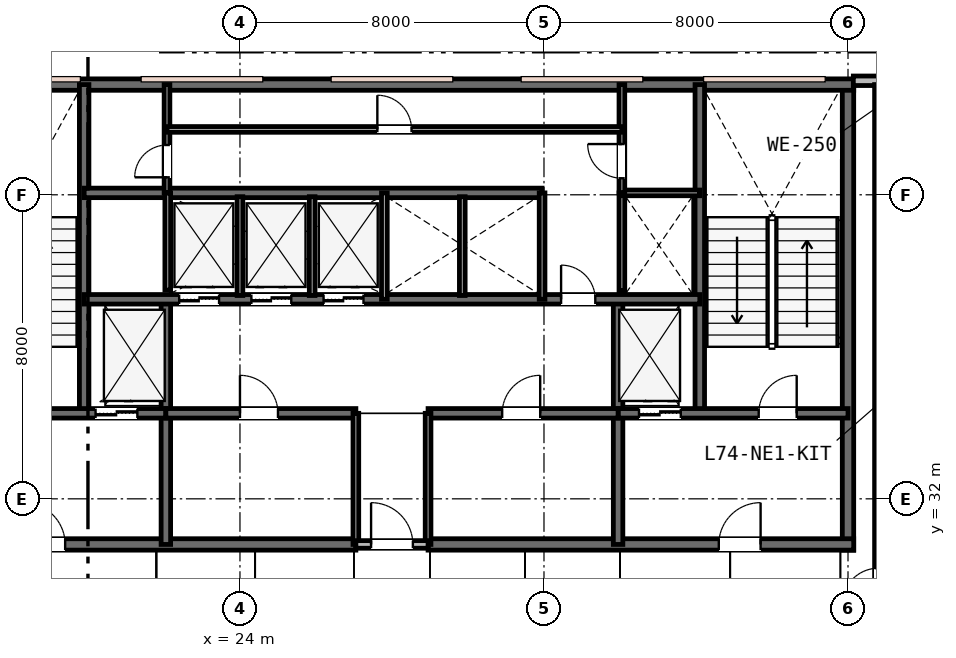
"""IFC4 building model, lengths in metres.
Left out: names, types, materials, properties, quantities, classifications, styles, units other than length and angle.
Written with IfcOpenShell. Run it as: python <this file> out.ifc"""

import sys

from ifc_helpers import new_model, si_unit, direction, frame, frame_2d, origin, place, context, subcontext, project, spatial, rectangle, extrude, element, fill, save


model = new_model("IFC4")
c1 = context("Model", 3, precision=1e-05, world=origin(), true_north=direction((0.0, 1.0)))
c2 = subcontext(c1, "Body", "Model", "MODEL_VIEW")
j1 = project(units=[si_unit("LENGTHUNIT", "METRE"), si_unit("PLANEANGLEUNIT", "RADIAN")], contexts=[c1])
p1 = place(None, origin())
s1 = spatial("IfcSite", under=j1, at=p1, CompositionType="ELEMENT")
p2 = place(p1, origin())
s2 = spatial("IfcBuilding", under=s1, at=p2, CompositionType="ELEMENT")
p3 = place(p2, frame((0.0, 0.0, 286.8)))
s3 = spatial("IfcBuildingStorey", under=s2, at=p3, CompositionType="ELEMENT", Elevation=286.8)
p4 = place(p3, frame((40.0, 30.65, 0.0), z_axis=(0.0, 0.0, 1.0), x_axis=(0.0, 1.0, 0.0)))
e1 = element("IfcWall", 1, at=p4, inside=s3, PredefinedType="SHEAR", context=c2, shape_type="SweptSolid", body=[
    extrude(rectangle(XDim=12.3, YDim=0.3, at=frame_2d((6.15, 0.0))), origin(), (0.0, 0.0, 1.0), 3.8),
])
p5 = place(p3, frame((15.85, 42.9, 0.0), z_axis=(0.0, 0.0, 1.0), x_axis=(1.0, 0.0, 0.0)))
e2 = element("IfcWall", 2, at=p5, inside=s3, PredefinedType="SHEAR", context=c2, shape_type="SweptSolid", body=[
    extrude(rectangle(XDim=24.3, YDim=0.3, at=frame_2d((12.15, 0.0))), origin(), (0.0, 0.0, 1.0), 3.8),
])
p6 = place(p3, frame((15.85, 30.8, 0.0), z_axis=(0.0, 0.0, 1.0), x_axis=(1.0, 0.0, 0.0)))
e3 = element("IfcWall", 3, at=p6, inside=s3, PredefinedType="SHEAR", context=c2, shape_type="SweptSolid", body=[
    extrude(rectangle(XDim=11.2, YDim=0.3, at=frame_2d((5.6, 0.0))), origin(), (0.0, 0.0, 1.0), 3.8),
])
p7 = place(p6, frame((2.45, 0.0, 0.0)))
e4 = element("IfcOpeningElement", 4, at=p7, cuts=e3, PredefinedType="OPENING", context=c2, shape_type="SweptSolid", body=[
    extrude(rectangle(XDim=1.1, YDim=2.15, at=frame_2d((0.55, 1.075))), frame((0.0, 0.16, 0.0), z_axis=(0.0, -1.0, 0.0), x_axis=(1.0, 0.0, 0.0)), (0.0, 0.0, 1.0), 0.32),
])
p8 = place(p3, frame((28.95, 30.8, 0.0), z_axis=(0.0, 0.0, 1.0), x_axis=(1.0, 0.0, 0.0)))
e5 = element("IfcWall", 5, at=p8, inside=s3, PredefinedType="SHEAR", context=c2, shape_type="SweptSolid", body=[
    extrude(rectangle(XDim=11.2, YDim=0.3, at=frame_2d((5.6, 0.0))), origin(), (0.0, 0.0, 1.0), 3.8),
])
p9 = place(p8, frame((7.65, 0.0, 0.0)))
e6 = element("IfcOpeningElement", 6, at=p9, cuts=e5, PredefinedType="OPENING", context=c2, shape_type="SweptSolid", body=[
    extrude(rectangle(XDim=1.1, YDim=2.15, at=frame_2d((0.55, 1.075))), frame((0.0, 0.16, 0.0), z_axis=(0.0, -1.0, 0.0), x_axis=(1.0, 0.0, 0.0)), (0.0, 0.0, 1.0), 0.32),
])
for number, where, z_axis, x_axis in (
    (7, (19.9, 34.25, 0.0), (0.0, 0.0, 1.0), (0.0, 1.0, 0.0)),
    (8, (36.1, 34.25, 0.0), (0.0, 0.0, 1.0), (0.0, 1.0, 0.0)),
):
    element("IfcWall", number, at=place(p3, frame(where, z_axis=z_axis, x_axis=x_axis)), inside=s3, PredefinedType="SHEAR", context=c2, shape_type="SweptSolid", body=[
        extrude(rectangle(XDim=8.65, YDim=0.25, at=frame_2d((4.325, 0.0))), origin(), (0.0, 0.0, 1.0), 3.8),
    ])
for number, where, z_axis, x_axis in (
    (9, (22.05, 30.8, 0.0), (0.0, 0.0, 1.0), (0.0, 1.0, 0.0)),
    (10, (33.95, 30.8, 0.0), (0.0, 0.0, 1.0), (0.0, 1.0, 0.0)),
):
    element("IfcWall", number, at=place(p3, frame(where, z_axis=z_axis, x_axis=x_axis)), inside=s3, PredefinedType="SHEAR", context=c2, shape_type="SweptSolid", body=[
        extrude(rectangle(XDim=6.45, YDim=0.25, at=frame_2d((3.225, 0.0))), origin(), (0.0, 0.0, 1.0), 3.8),
    ])
p10 = place(p3, frame((16.0, 34.25, 0.0), z_axis=(0.0, 0.0, 1.0), x_axis=(1.0, 0.0, 0.0)))
e11 = element("IfcWall", 11, at=p10, inside=s3, PredefinedType="SHEAR", context=c2, shape_type="SweptSolid", body=[
    extrude(rectangle(XDim=6.05, YDim=0.25, at=frame_2d((3.025, 0.0))), origin(), (0.0, 0.0, 1.0), 3.8),
])
p11 = place(p10, frame((1.25, 0.0, 0.0)))
e12 = element("IfcOpeningElement", 12, at=p11, cuts=e11, PredefinedType="OPENING", context=c2, shape_type="SweptSolid", body=[
    extrude(rectangle(XDim=1.0, YDim=2.15, at=frame_2d((0.5, 1.075))), frame((0.0, 0.135, 0.0), z_axis=(0.0, -1.0, 0.0), x_axis=(1.0, 0.0, 0.0)), (0.0, 0.0, 1.0), 0.27),
])
p12 = place(p10, frame((4.2, 0.0, 0.0)))
e13 = element("IfcOpeningElement", 13, at=p12, cuts=e11, PredefinedType="OPENING", context=c2, shape_type="SweptSolid", body=[
    extrude(rectangle(XDim=1.1, YDim=2.15, at=frame_2d((0.55, 1.075))), frame((0.0, 0.135, 0.0), z_axis=(0.0, -1.0, 0.0), x_axis=(1.0, 0.0, 0.0)), (0.0, 0.0, 1.0), 0.27),
])
p13 = place(p3, frame((33.95, 34.25, 0.0), z_axis=(0.0, 0.0, 1.0), x_axis=(1.0, 0.0, 0.0)))
e14 = element("IfcWall", 14, at=p13, inside=s3, PredefinedType="SHEAR", context=c2, shape_type="SweptSolid", body=[
    extrude(rectangle(XDim=6.05, YDim=0.25, at=frame_2d((3.025, 0.0))), origin(), (0.0, 0.0, 1.0), 3.8),
])
p14 = place(p13, frame((3.7, 0.0, 0.0)))
e15 = element("IfcOpeningElement", 15, at=p14, cuts=e14, PredefinedType="OPENING", context=c2, shape_type="SweptSolid", body=[
    extrude(rectangle(XDim=1.0, YDim=2.15, at=frame_2d((0.5, 1.075))), frame((0.0, 0.135, 0.0), z_axis=(0.0, -1.0, 0.0), x_axis=(1.0, 0.0, 0.0)), (0.0, 0.0, 1.0), 0.27),
])
p15 = place(p13, frame((0.55, 0.0, 0.0)))
e16 = element("IfcOpeningElement", 16, at=p15, cuts=e14, PredefinedType="OPENING", context=c2, shape_type="SweptSolid", body=[
    extrude(rectangle(XDim=1.1, YDim=2.15, at=frame_2d((0.55, 1.075))), frame((0.0, 0.135, 0.0), z_axis=(0.0, -1.0, 0.0), x_axis=(1.0, 0.0, 0.0)), (0.0, 0.0, 1.0), 0.27),
])
p16 = place(p3, frame((22.05, 34.25, 0.0), z_axis=(0.0, 0.0, 1.0), x_axis=(1.0, 0.0, 0.0)))
e17 = element("IfcWall", 17, at=p16, inside=s3, PredefinedType="SHEAR", context=c2, shape_type="SweptSolid", body=[
    extrude(rectangle(XDim=5.0, YDim=0.25, at=frame_2d((2.5, 0.0))), origin(), (0.0, 0.0, 1.0), 3.8),
])
p17 = place(p16, frame((1.95, 0.0, 0.0)))
e18 = element("IfcOpeningElement", 18, at=p17, cuts=e17, PredefinedType="OPENING", context=c2, shape_type="SweptSolid", body=[
    extrude(rectangle(XDim=1.0, YDim=2.15, at=frame_2d((0.5, 1.075))), frame((0.0, 0.135, 0.0), z_axis=(0.0, -1.0, 0.0), x_axis=(1.0, 0.0, 0.0)), (0.0, 0.0, 1.0), 0.27),
])
p18 = place(p3, frame((28.95, 34.25, 0.0), z_axis=(0.0, 0.0, 1.0), x_axis=(1.0, 0.0, 0.0)))
e19 = element("IfcWall", 19, at=p18, inside=s3, PredefinedType="SHEAR", context=c2, shape_type="SweptSolid", body=[
    extrude(rectangle(XDim=5.0, YDim=0.25, at=frame_2d((2.5, 0.0))), origin(), (0.0, 0.0, 1.0), 3.8),
])
p19 = place(p18, frame((1.95, 0.0, 0.0)))
e20 = element("IfcOpeningElement", 20, at=p19, cuts=e19, PredefinedType="OPENING", context=c2, shape_type="SweptSolid", body=[
    extrude(rectangle(XDim=1.0, YDim=2.15, at=frame_2d((0.5, 1.075))), frame((0.0, 0.135, 0.0), z_axis=(0.0, -1.0, 0.0), x_axis=(1.0, 0.0, 0.0)), (0.0, 0.0, 1.0), 0.27),
])
p20 = place(p3, frame((19.9, 37.25, 0.0), z_axis=(0.0, 0.0, 1.0), x_axis=(1.0, 0.0, 0.0)))
e21 = element("IfcWall", 21, at=p20, inside=s3, PredefinedType="SHEAR", context=c2, shape_type="SweptSolid", body=[
    extrude(rectangle(XDim=16.2, YDim=0.25, at=frame_2d((8.1, 0.0))), origin(), (0.0, 0.0, 1.0), 3.8),
])
p21 = place(p20, frame((12.55, 0.0, 0.0)))
e22 = element("IfcOpeningElement", 22, at=p21, cuts=e21, PredefinedType="OPENING", context=c2, shape_type="SweptSolid", body=[
    extrude(rectangle(XDim=0.9, YDim=2.15, at=frame_2d((0.45, 1.075))), frame((0.0, 0.135, 0.0), z_axis=(0.0, -1.0, 0.0), x_axis=(1.0, 0.0, 0.0)), (0.0, 0.0, 1.0), 0.27),
])
p22 = place(p20, frame((2.5, 0.0, 0.0)))
e23 = element("IfcOpeningElement", 23, at=p22, cuts=e21, PredefinedType="OPENING", context=c2, shape_type="SweptSolid", body=[
    extrude(rectangle(XDim=1.05, YDim=2.15, at=frame_2d((0.525, 1.075))), frame((0.0, 0.135, 0.0), z_axis=(0.0, -1.0, 0.0), x_axis=(1.0, 0.0, 0.0)), (0.0, 0.0, 1.0), 0.27),
])
p23 = place(p20, frame((4.4, 0.0, 0.0)))
e24 = element("IfcOpeningElement", 24, at=p23, cuts=e21, PredefinedType="OPENING", context=c2, shape_type="SweptSolid", body=[
    extrude(rectangle(XDim=1.05, YDim=2.15, at=frame_2d((0.525, 1.075))), frame((0.0, 0.135, 0.0), z_axis=(0.0, -1.0, 0.0), x_axis=(1.0, 0.0, 0.0)), (0.0, 0.0, 1.0), 0.27),
])
p24 = place(p20, frame((6.3, 0.0, 0.0)))
e25 = element("IfcOpeningElement", 25, at=p24, cuts=e21, PredefinedType="OPENING", context=c2, shape_type="SweptSolid", body=[
    extrude(rectangle(XDim=1.05, YDim=2.15, at=frame_2d((0.525, 1.075))), frame((0.0, 0.135, 0.0), z_axis=(0.0, -1.0, 0.0), x_axis=(1.0, 0.0, 0.0)), (0.0, 0.0, 1.0), 0.27),
])
p25 = place(p3, frame((19.9, 40.05, 0.0), z_axis=(0.0, 0.0, 1.0), x_axis=(1.0, 0.0, 0.0)))
e26 = element("IfcWall", 26, at=p25, inside=s3, PredefinedType="SHEAR", context=c2, shape_type="SweptSolid", body=[
    extrude(rectangle(XDim=12.05, YDim=0.25, at=frame_2d((6.025, 0.0))), origin(), (0.0, 0.0, 1.0), 3.8),
])
p26 = place(p3, frame((43.4, 43.0, 0.0), z_axis=(0.0, 0.0, 1.0), x_axis=(-1.0, 0.0, 0.0)))
e27 = element("IfcWall", 27, at=p26, inside=s3, PredefinedType="STANDARD", context=c2, shape_type="SweptSolid", body=[
    extrude(rectangle(XDim=3.26, YDim=0.25, at=frame_2d((1.63, 0.0))), origin(), (0.0, 0.0, 1.0), 3.47),
])
p27 = place(p26, frame((0.86, 0.0, 0.85)))
e28 = element("IfcOpeningElement", 28, at=p27, cuts=e27, PredefinedType="OPENING", context=c2, shape_type="SweptSolid", body=[
    extrude(rectangle(XDim=1.2, YDim=1.6, at=frame_2d((0.6, 0.8))), frame((0.0, 0.135, 0.0), z_axis=(0.0, -1.0, 0.0), x_axis=(1.0, 0.0, 0.0)), (0.0, 0.0, 1.0), 0.27),
])
for number, where, z_axis, x_axis in (
    (29, (27.05, 30.8, 0.0), (0.0, 0.0, 1.0), (0.0, 1.0, 0.0)),
    (30, (28.95, 30.8, 0.0), (0.0, 0.0, 1.0), (0.0, 1.0, 0.0)),
):
    element("IfcWall", number, at=place(p3, frame(where, z_axis=z_axis, x_axis=x_axis)), inside=s3, PredefinedType="PLUMBINGWALL", context=c2, shape_type="SweptSolid", body=[
        extrude(rectangle(XDim=3.45, YDim=0.15, at=frame_2d((1.725, 0.0))), origin(), (0.0, 0.0, 1.0), 3.27),
    ])
p28 = place(p3, frame((27.05, 30.8, 0.0), z_axis=(0.0, 0.0, 1.0), x_axis=(1.0, 0.0, 0.0)))
e31 = element("IfcWall", 31, at=p28, inside=s3, PredefinedType="PARTITIONING", context=c2, shape_type="SweptSolid", body=[
    extrude(rectangle(XDim=1.9, YDim=0.2, at=frame_2d((0.95, 0.0))), origin(), (0.0, 0.0, 1.0), 3.27),
])
p29 = place(p28, frame((0.4, 0.0, 0.0)))
e32 = element("IfcOpeningElement", 32, at=p29, cuts=e31, PredefinedType="OPENING", context=c2, shape_type="SweptSolid", body=[
    extrude(rectangle(XDim=1.1, YDim=2.15, at=frame_2d((0.55, 1.075))), frame((0.0, 0.11, 0.0), z_axis=(0.0, -1.0, 0.0), x_axis=(1.0, 0.0, 0.0)), (0.0, 0.0, 1.0), 0.22),
])
p30 = place(p3, frame((22.1, 37.49, 0.0), z_axis=(0.0, 0.0, 1.0), x_axis=(0.0, 1.0, 0.0)))
e33 = element("IfcWall", 33, at=p30, inside=s3, PredefinedType="PLUMBINGWALL", context=c2, shape_type="SweptSolid", body=[
    extrude(rectangle(XDim=2.56, YDim=0.15, at=frame_2d((1.28, 0.0))), origin(), (0.0, 0.0, 1.0), 3.47),
])
p31 = place(p3, frame((27.8, 37.25, 0.0), z_axis=(0.0, 0.0, 1.0), x_axis=(0.0, 1.0, 0.0)))
e34 = element("IfcWall", 34, at=p31, inside=s3, PredefinedType="PLUMBINGWALL", context=c2, shape_type="SweptSolid", body=[
    extrude(rectangle(XDim=2.8, YDim=0.15, at=frame_2d((1.4, 0.0))), origin(), (0.0, 0.0, 1.0), 3.47),
])
for number, where, z_axis, x_axis in (
    (35, (24.0, 37.35, 0.0), (0.0, 0.0, 1.0), (0.0, 1.0, 0.0)),
    (36, (25.9, 37.35, 0.0), (0.0, 0.0, 1.0), (0.0, 1.0, 0.0)),
):
    element("IfcWall", number, at=place(p3, frame(where, z_axis=z_axis, x_axis=x_axis)), inside=s3, PredefinedType="PLUMBINGWALL", context=c2, shape_type="SweptSolid", body=[
        extrude(rectangle(XDim=2.6, YDim=0.15, at=frame_2d((1.3, 0.0))), origin(), (0.0, 0.0, 1.0), 3.47),
    ])
p32 = place(p3, frame((31.95, 37.25, 0.0), z_axis=(0.0, 0.0, 1.0), x_axis=(0.0, 1.0, 0.0)))
e37 = element("IfcWall", 37, at=p32, inside=s3, PredefinedType="PLUMBINGWALL", context=c2, shape_type="SweptSolid", body=[
    extrude(rectangle(XDim=2.8, YDim=0.15, at=frame_2d((1.4, 0.0))), origin(), (0.0, 0.0, 1.0), 3.47),
])
p33 = place(p3, frame((29.85, 37.35, 0.0), z_axis=(0.0, 0.0, 1.0), x_axis=(0.0, 1.0, 0.0)))
e38 = element("IfcWall", 38, at=p33, inside=s3, PredefinedType="PLUMBINGWALL", context=c2, shape_type="SweptSolid", body=[
    extrude(rectangle(XDim=2.6, YDim=0.15, at=frame_2d((1.3, 0.0))), origin(), (0.0, 0.0, 1.0), 3.47),
])
p34 = place(p3, frame((34.05, 37.473, 0.0), z_axis=(0.0, 0.0, 1.0), x_axis=(0.0, 1.0, 0.0)))
e39 = element("IfcWall", 39, at=p34, inside=s3, PredefinedType="PLUMBINGWALL", context=c2, shape_type="SweptSolid", body=[
    extrude(rectangle(XDim=2.577, YDim=0.15, at=frame_2d((1.288, 0.0))), origin(), (0.0, 0.0, 1.0), 3.47),
])
p35 = place(p3, frame((34.05, 40.05, 0.0), z_axis=(0.0, 0.0, 1.0), x_axis=(1.0, 0.0, 0.0)))
e40 = element("IfcWall", 40, at=p35, inside=s3, PredefinedType="PARTITIONING", context=c2, shape_type="SweptSolid", body=[
    extrude(rectangle(XDim=2.05, YDim=0.15, at=frame_2d((1.025, 0.0))), origin(), (0.0, 0.0, 1.0), 3.47),
])
p36 = place(p3, frame((34.05, 40.05, 0.0), z_axis=(0.0, 0.0, 1.0), x_axis=(0.0, 1.0, 0.0)))
e41 = element("IfcWall", 41, at=p36, inside=s3, PredefinedType="PARTITIONING", context=c2, shape_type="SweptSolid", body=[
    extrude(rectangle(XDim=2.85, YDim=0.15, at=frame_2d((1.425, 0.0))), origin(), (0.0, 0.0, 1.0), 3.47),
])
p37 = place(p36, frame((0.385, 0.0, 0.0)))
e42 = element("IfcOpeningElement", 42, at=p37, cuts=e41, PredefinedType="OPENING", context=c2, shape_type="SweptSolid", body=[
    extrude(rectangle(XDim=0.9, YDim=2.15, at=frame_2d((0.45, 1.075))), frame((0.0, 0.085, 0.0), z_axis=(0.0, -1.0, 0.0), x_axis=(1.0, 0.0, 0.0)), (0.0, 0.0, 1.0), 0.17),
])
p38 = place(p3, frame((22.08, 40.05, 0.0), z_axis=(0.0, 0.0, 1.0), x_axis=(0.0, 1.0, 0.0)))
e43 = element("IfcWall", 43, at=p38, inside=s3, PredefinedType="PARTITIONING", context=c2, shape_type="SweptSolid", body=[
    extrude(rectangle(XDim=2.85, YDim=0.15, at=frame_2d((1.425, 0.0))), origin(), (0.0, 0.0, 1.0), 3.47),
])
p39 = place(p38, frame((0.41, 0.0, 0.0)))
e44 = element("IfcOpeningElement", 44, at=p39, cuts=e43, PredefinedType="OPENING", context=c2, shape_type="SweptSolid", body=[
    extrude(rectangle(XDim=0.85, YDim=2.15, at=frame_2d((0.425, 1.075))), frame((0.0, 0.085, 0.0), z_axis=(0.0, -1.0, 0.0), x_axis=(1.0, 0.0, 0.0)), (0.0, 0.0, 1.0), 0.17),
])
p40 = place(p3, frame((22.08, 41.72, 0.0), z_axis=(0.0, 0.0, 1.0), x_axis=(1.0, 0.0, 0.0)))
e45 = element("IfcWall", 45, at=p40, inside=s3, PredefinedType="PARTITIONING", context=c2, shape_type="SweptSolid", body=[
    extrude(rectangle(XDim=11.97, YDim=0.15, at=frame_2d((5.985, 0.0))), origin(), (0.0, 0.0, 1.0), 3.47),
])
p41 = place(p40, frame((5.535, 0.0, 0.0)))
e46 = element("IfcOpeningElement", 46, at=p41, cuts=e45, PredefinedType="OPENING", context=c2, shape_type="SweptSolid", body=[
    extrude(rectangle(XDim=0.9, YDim=2.15, at=frame_2d((0.45, 1.075))), frame((0.0, 0.085, 0.0), z_axis=(0.0, -1.0, 0.0), x_axis=(1.0, 0.0, 0.0)), (0.0, 0.0, 1.0), 0.17),
])
p42 = place(p3, frame((40.8, 28.6, 0.0), z_axis=(0.0, 0.0, 1.0), x_axis=(0.0, 1.0, 0.0)))
e47 = element("IfcWall", 47, at=p42, inside=s3, PredefinedType="PARTITIONING", context=c2, shape_type="SweptSolid", body=[
    extrude(rectangle(XDim=14.3, YDim=0.2, at=frame_2d((7.15, 0.0))), origin(), (0.0, 0.0, 1.0), 3.47),
])
p43 = place(p42, frame((0.625, 0.0, 0.0)))
e48 = element("IfcOpeningElement", 48, at=p43, cuts=e47, PredefinedType="OPENING", context=c2, shape_type="SweptSolid", body=[
    extrude(rectangle(XDim=0.95, YDim=2.15, at=frame_2d((0.475, 1.075))), frame((0.0, 0.11, 0.0), z_axis=(0.0, -1.0, 0.0), x_axis=(1.0, 0.0, 0.0)), (0.0, 0.0, 1.0), 0.22),
])
p44 = place(p29, origin())
e49 = element("IfcDoor", 49, at=p44, inside=s3, OperationType="SINGLE_SWING_LEFT", PredefinedType="DOOR", context=c2, shape_type="SweptSolid", body=[
    extrude(rectangle(XDim=1.1, YDim=2.15, at=frame_2d((0.55, 1.075))), frame((0.0, 0.025, 0.0), z_axis=(0.0, -1.0, 0.0), x_axis=(1.0, 0.0, 0.0)), (0.0, 0.0, 1.0), 0.05),
])
fill(e32, e49)
p45 = place(p14, origin())
e50 = element("IfcDoor", 50, at=p45, inside=s3, OperationType="SINGLE_SWING_RIGHT", PredefinedType="DOOR", context=c2, shape_type="SweptSolid", body=[
    extrude(rectangle(XDim=1.0, YDim=2.15, at=frame_2d((0.5, 1.075))), frame((0.0, 0.025, 0.0), z_axis=(0.0, -1.0, 0.0), x_axis=(1.0, 0.0, 0.0)), (0.0, 0.0, 1.0), 0.05),
])
fill(e15, e50)
p46 = place(p7, origin())
e51 = element("IfcDoor", 51, at=p46, inside=s3, OperationType="SINGLE_SWING_LEFT", PredefinedType="DOOR", context=c2, shape_type="SweptSolid", body=[
    extrude(rectangle(XDim=1.1, YDim=2.15, at=frame_2d((0.55, 1.075))), frame((0.0, 0.025, 0.0), z_axis=(0.0, -1.0, 0.0), x_axis=(1.0, 0.0, 0.0)), (0.0, 0.0, 1.0), 0.05),
])
fill(e4, e51)
p47 = place(p9, origin())
e52 = element("IfcDoor", 52, at=p47, inside=s3, OperationType="SINGLE_SWING_RIGHT", PredefinedType="DOOR", context=c2, shape_type="SweptSolid", body=[
    extrude(rectangle(XDim=1.1, YDim=2.15, at=frame_2d((0.55, 1.075))), frame((0.0, 0.025, 0.0), z_axis=(0.0, -1.0, 0.0), x_axis=(1.0, 0.0, 0.0)), (0.0, 0.0, 1.0), 0.05),
])
fill(e6, e52)
p48 = place(p17, origin())
e53 = element("IfcDoor", 53, at=p48, inside=s3, OperationType="SINGLE_SWING_LEFT", PredefinedType="DOOR", context=c2, shape_type="SweptSolid", body=[
    extrude(rectangle(XDim=1.0, YDim=2.15, at=frame_2d((0.5, 1.075))), frame((0.0, 0.025, 0.0), z_axis=(0.0, -1.0, 0.0), x_axis=(1.0, 0.0, 0.0)), (0.0, 0.0, 1.0), 0.05),
])
fill(e18, e53)
p49 = place(p19, origin())
e54 = element("IfcDoor", 54, at=p49, inside=s3, OperationType="SINGLE_SWING_RIGHT", PredefinedType="DOOR", context=c2, shape_type="SweptSolid", body=[
    extrude(rectangle(XDim=1.0, YDim=2.15, at=frame_2d((0.5, 1.075))), frame((0.0, 0.025, 0.0), z_axis=(0.0, -1.0, 0.0), x_axis=(1.0, 0.0, 0.0)), (0.0, 0.0, 1.0), 0.05),
])
fill(e20, e54)
p50 = place(p21, origin())
e55 = element("IfcDoor", 55, at=p50, inside=s3, OperationType="SINGLE_SWING_LEFT", PredefinedType="DOOR", context=c2, shape_type="SweptSolid", body=[
    extrude(rectangle(XDim=0.9, YDim=2.15, at=frame_2d((0.45, 1.075))), frame((0.0, 0.025, 0.0), z_axis=(0.0, -1.0, 0.0), x_axis=(1.0, 0.0, 0.0)), (0.0, 0.0, 1.0), 0.05),
])
fill(e22, e55)
p51 = place(p37, origin())
e56 = element("IfcDoor", 56, at=p51, inside=s3, OperationType="SINGLE_SWING_RIGHT", PredefinedType="DOOR", context=c2, shape_type="SweptSolid", body=[
    extrude(rectangle(XDim=0.9, YDim=2.15, at=frame_2d((0.45, 1.075))), frame((0.0, 0.025, 0.0), z_axis=(0.0, -1.0, 0.0), x_axis=(1.0, 0.0, 0.0)), (0.0, 0.0, 1.0), 0.05),
])
fill(e42, e56)
p52 = place(p39, origin())
e57 = element("IfcDoor", 57, at=p52, inside=s3, OperationType="SINGLE_SWING_LEFT", PredefinedType="DOOR", context=c2, shape_type="SweptSolid", body=[
    extrude(rectangle(XDim=0.85, YDim=2.15, at=frame_2d((0.425, 1.075))), frame((0.0, 0.025, 0.0), z_axis=(0.0, -1.0, 0.0), x_axis=(1.0, 0.0, 0.0)), (0.0, 0.0, 1.0), 0.05),
])
fill(e44, e57)
p53 = place(p41, origin())
e58 = element("IfcDoor", 58, at=p53, inside=s3, OperationType="SINGLE_SWING_LEFT", PredefinedType="DOOR", context=c2, shape_type="SweptSolid", body=[
    extrude(rectangle(XDim=0.9, YDim=2.15, at=frame_2d((0.45, 1.075))), frame((0.0, 0.025, 0.0), z_axis=(0.0, -1.0, 0.0), x_axis=(1.0, 0.0, 0.0)), (0.0, 0.0, 1.0), 0.05),
])
fill(e46, e58)
p54 = place(p12, origin())
e59 = element("IfcDoor", 59, at=p54, inside=s3, OperationType="DOUBLE_DOOR_SLIDING", PredefinedType="DOOR", context=c2, shape_type="SweptSolid", body=[
    extrude(rectangle(XDim=1.1, YDim=2.15, at=frame_2d((0.55, 1.075))), frame((0.0, 0.025, 0.0), z_axis=(0.0, -1.0, 0.0), x_axis=(1.0, 0.0, 0.0)), (0.0, 0.0, 1.0), 0.05),
])
fill(e13, e59)
p55 = place(p15, origin())
e60 = element("IfcDoor", 60, at=p55, inside=s3, OperationType="DOUBLE_DOOR_SLIDING", PredefinedType="DOOR", context=c2, shape_type="SweptSolid", body=[
    extrude(rectangle(XDim=1.1, YDim=2.15, at=frame_2d((0.55, 1.075))), frame((0.0, 0.025, 0.0), z_axis=(0.0, -1.0, 0.0), x_axis=(1.0, 0.0, 0.0)), (0.0, 0.0, 1.0), 0.05),
])
fill(e16, e60)
p56 = place(p22, origin())
e61 = element("IfcDoor", 61, at=p56, inside=s3, OperationType="DOUBLE_DOOR_SLIDING", PredefinedType="DOOR", context=c2, shape_type="SweptSolid", body=[
    extrude(rectangle(XDim=1.05, YDim=2.15, at=frame_2d((0.525, 1.075))), frame((0.0, 0.025, 0.0), z_axis=(0.0, -1.0, 0.0), x_axis=(1.0, 0.0, 0.0)), (0.0, 0.0, 1.0), 0.05),
])
fill(e23, e61)
p57 = place(p23, origin())
e62 = element("IfcDoor", 62, at=p57, inside=s3, OperationType="DOUBLE_DOOR_SLIDING", PredefinedType="DOOR", context=c2, shape_type="SweptSolid", body=[
    extrude(rectangle(XDim=1.05, YDim=2.15, at=frame_2d((0.525, 1.075))), frame((0.0, 0.025, 0.0), z_axis=(0.0, -1.0, 0.0), x_axis=(1.0, 0.0, 0.0)), (0.0, 0.0, 1.0), 0.05),
])
fill(e24, e62)
p58 = place(p24, origin())
e63 = element("IfcDoor", 63, at=p58, inside=s3, OperationType="DOUBLE_DOOR_SLIDING", PredefinedType="DOOR", context=c2, shape_type="SweptSolid", body=[
    extrude(rectangle(XDim=1.05, YDim=2.15, at=frame_2d((0.525, 1.075))), frame((0.0, 0.025, 0.0), z_axis=(0.0, -1.0, 0.0), x_axis=(1.0, 0.0, 0.0)), (0.0, 0.0, 1.0), 0.05),
])
fill(e25, e63)
save(model, sys.argv[1])
